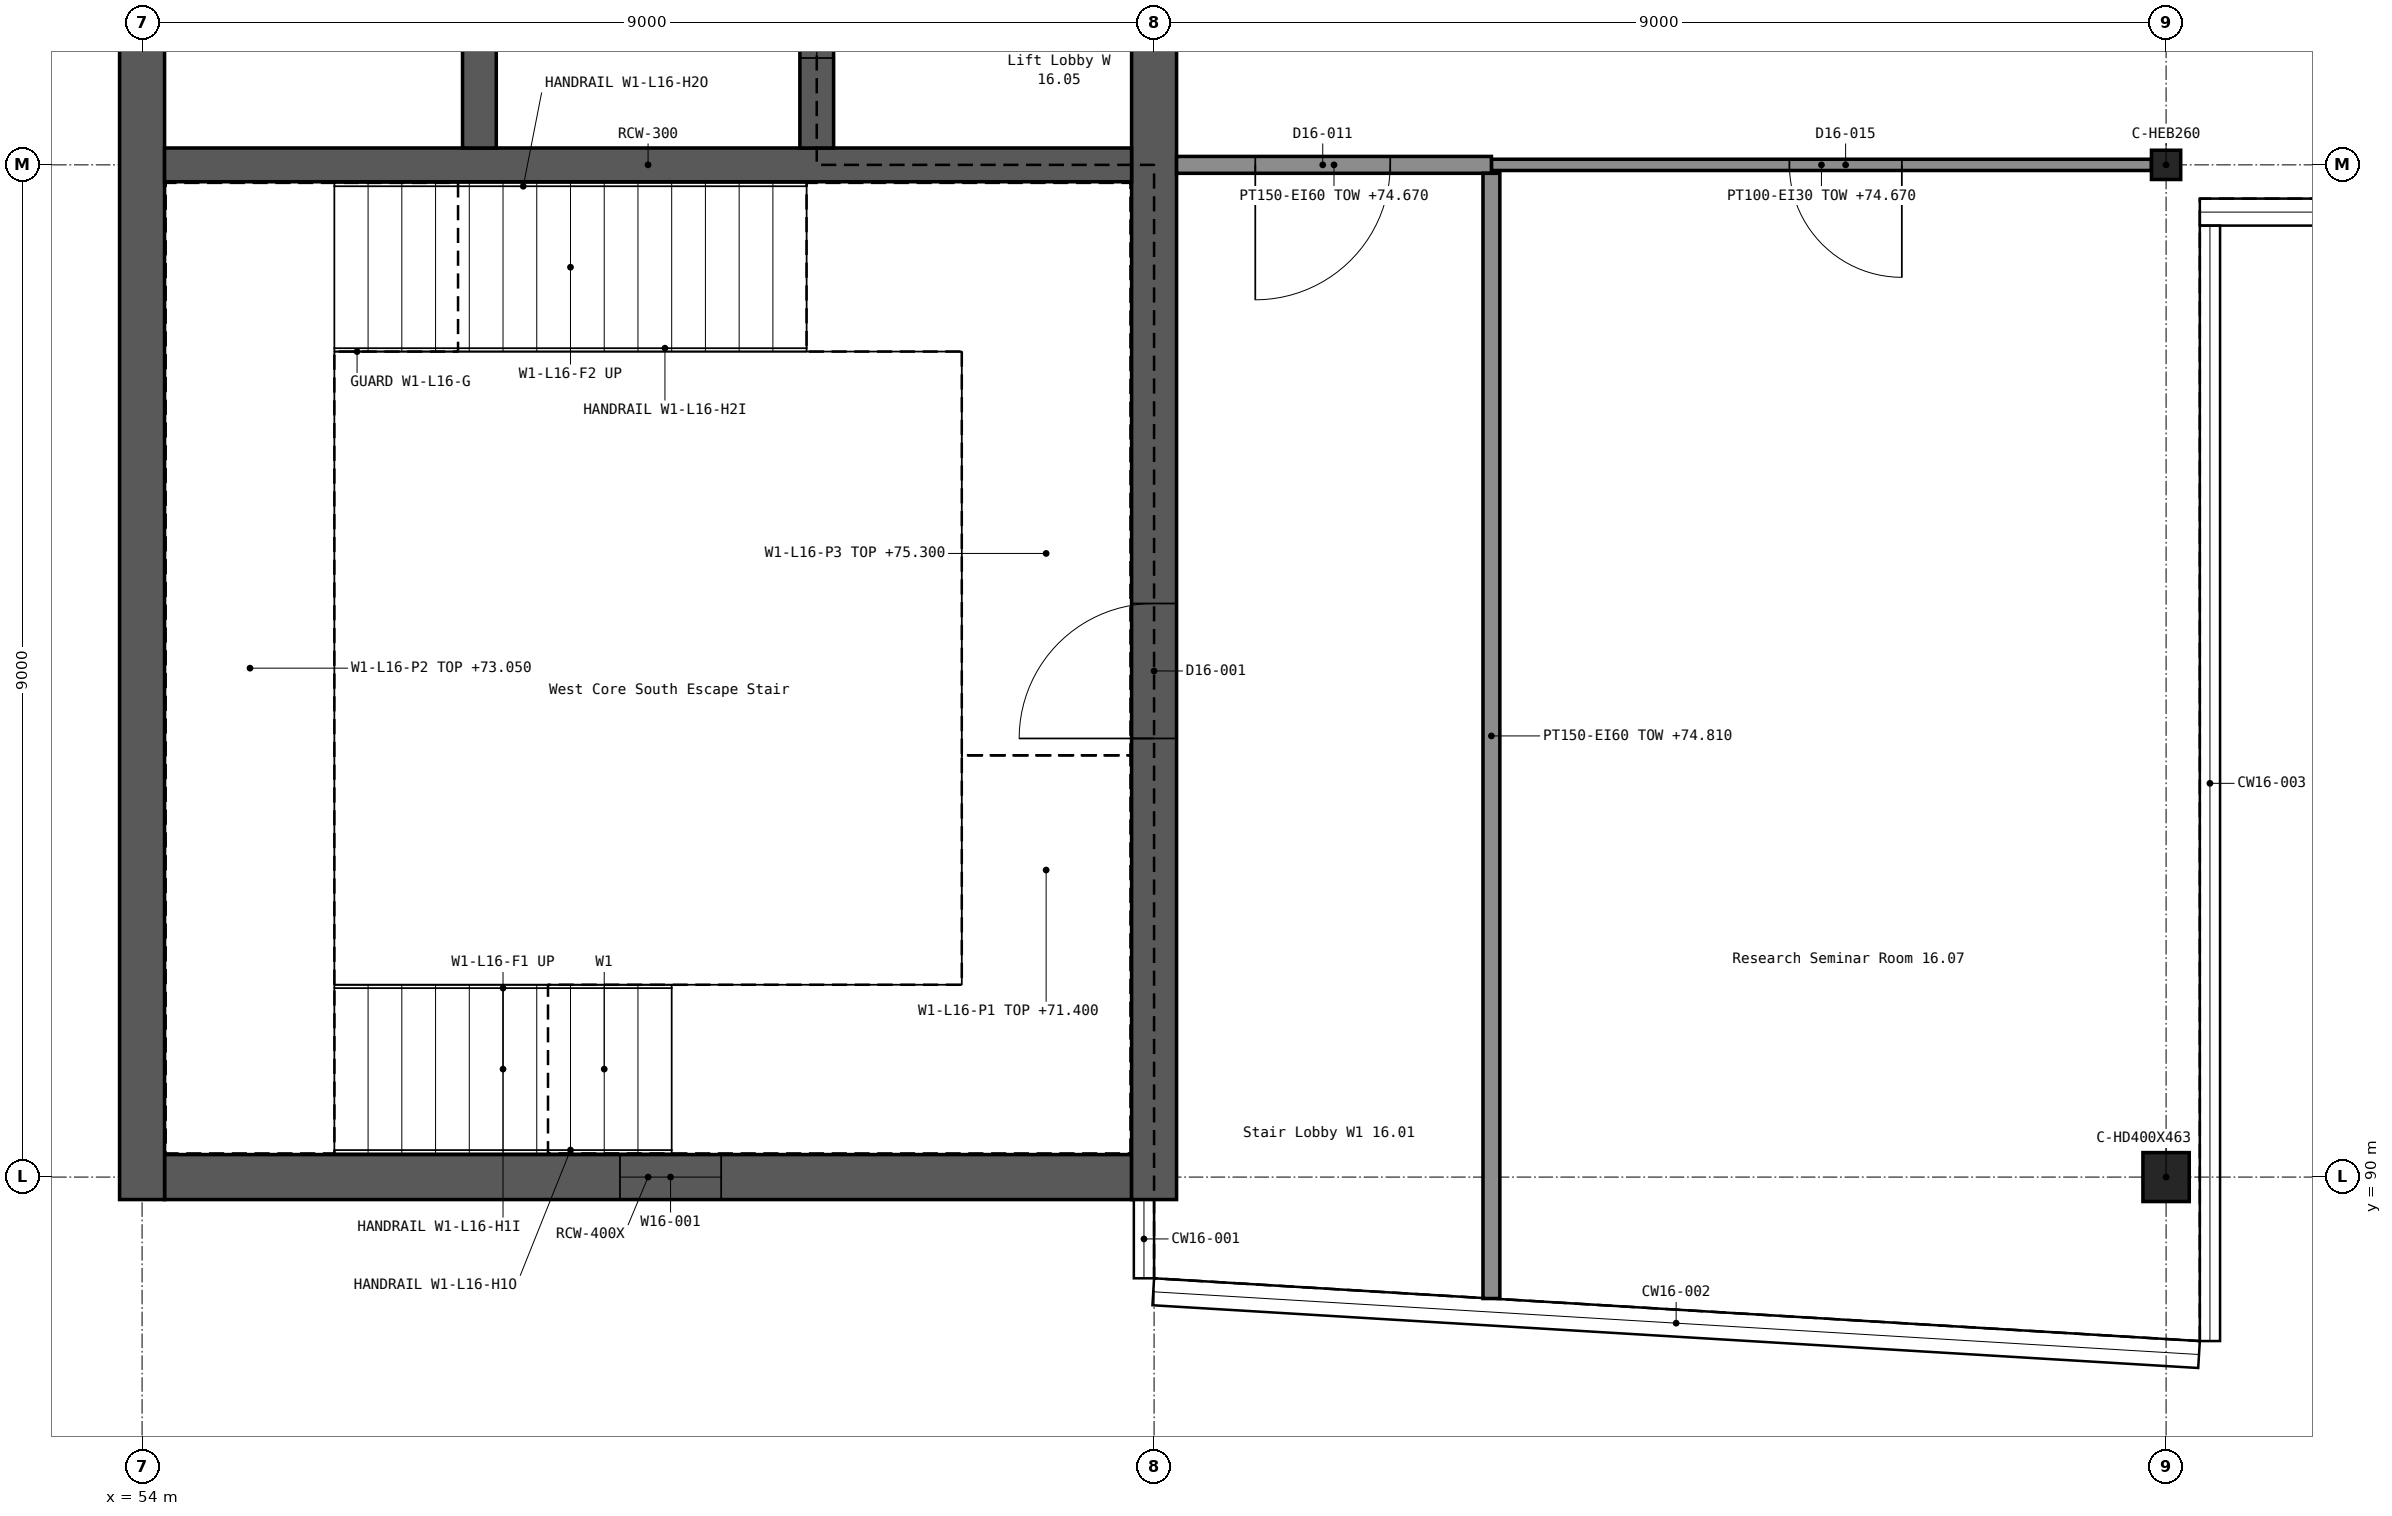
"""IFC4 building model, lengths in metres.
Left out: names, types, materials, properties, quantities, classifications, styles, units other than length and angle.
Written with IfcOpenShell. Run it as: python <this file> out.ifc"""

import sys

from ifc_helpers import new_model, si_unit, direction, frame, frame_2d, origin, origin_2d, place, context, subcontext, project, spatial, rectangle, i_section, extrude, element, fill, save


model = new_model("IFC4")
c1 = context("Model", 3, precision=1e-05, world=origin(), true_north=direction((0.0, 1.0)))
c2 = subcontext(c1, "Body", "Model", "MODEL_VIEW")
j1 = project(units=[si_unit("LENGTHUNIT", "METRE"), si_unit("PLANEANGLEUNIT", "RADIAN")], contexts=[c1])
p1 = place(None, origin())
s1 = spatial("IfcSite", under=j1, at=p1, CompositionType="ELEMENT")
p2 = place(p1, origin())
s2 = spatial("IfcBuilding", under=s1, at=p2, CompositionType="ELEMENT")
p3 = place(p2, frame((0.0, 0.0, 71.4)))
s3 = spatial("IfcBuildingStorey", under=s2, at=p3, CompositionType="ELEMENT", Elevation=71.4)
p4 = place(p3, frame((54.2, 90.0, 0.0), z_axis=(0.0, 0.0, 1.0), x_axis=(1.0, 0.0, 0.0)))
e1 = element("IfcWall", 1, at=p4, inside=s3, PredefinedType="SHEAR", context=c2, shape_type="SweptSolid", body=[
    extrude(rectangle(XDim=8.6, YDim=0.4, at=frame_2d((4.3, 0.0))), origin(), (0.0, 0.0, 1.0), 3.9),
])
p5 = place(p4, frame((4.05, 0.0, 1.2)))
e2 = element("IfcOpeningElement", 2, at=p5, cuts=e1, PredefinedType="OPENING", context=c2, shape_type="SweptSolid", body=[
    extrude(rectangle(XDim=0.9, YDim=1.5, at=frame_2d((0.45, 0.75))), frame((0.0, 0.211, 0.0), z_axis=(0.0, -1.0, 0.0), x_axis=(1.0, 0.0, 0.0)), (0.0, 0.0, 1.0), 0.422),
])
p6 = place(p3, frame((54.0, 89.8, 0.0), z_axis=(0.0, 0.0, 1.0), x_axis=(0.0, 1.0, 0.0)))
e3 = element("IfcWall", 3, at=p6, inside=s3, PredefinedType="SHEAR", context=c2, shape_type="SweptSolid", body=[
    extrude(rectangle(XDim=27.4, YDim=0.4, at=frame_2d((13.7, 0.0))), origin(), (0.0, 0.0, 1.0), 3.9),
])
p7 = place(p3, frame((63.0, 89.8, 0.0), z_axis=(0.0, 0.0, 1.0), x_axis=(0.0, 1.0, 0.0)))
e4 = element("IfcWall", 4, at=p7, inside=s3, PredefinedType="SHEAR", context=c2, shape_type="SweptSolid", body=[
    extrude(rectangle(XDim=27.4, YDim=0.4, at=frame_2d((13.7, 0.0))), origin(), (0.0, 0.0, 1.0), 3.9),
])
p8 = place(p7, frame((4.1, 0.0, 0.0)))
e5 = element("IfcOpeningElement", 5, at=p8, cuts=e4, PredefinedType="OPENING", context=c2, shape_type="SweptSolid", body=[
    extrude(rectangle(XDim=1.2, YDim=2.1, at=frame_2d((0.6, 1.05))), frame((0.0, 0.211, 0.0), z_axis=(0.0, -1.0, 0.0), x_axis=(1.0, 0.0, 0.0)), (0.0, 0.0, 1.0), 0.422),
])
p9 = place(p7, frame((22.1, 0.0, 0.0)))
e6 = element("IfcOpeningElement", 6, at=p9, cuts=e4, PredefinedType="OPENING", context=c2, shape_type="SweptSolid", body=[
    extrude(rectangle(XDim=1.2, YDim=2.1, at=frame_2d((0.6, 1.05))), frame((0.0, 0.211, 0.0), z_axis=(0.0, -1.0, 0.0), x_axis=(1.0, 0.0, 0.0)), (0.0, 0.0, 1.0), 0.422),
])
p10 = place(p7, frame((12.5, 0.0, 0.0)))
e7 = element("IfcOpeningElement", 7, at=p10, cuts=e4, PredefinedType="OPENING", context=c2, shape_type="SweptSolid", body=[
    extrude(rectangle(XDim=2.0, YDim=2.1, at=frame_2d((1.0, 1.05))), frame((0.0, 0.211, 0.0), z_axis=(0.0, -1.0, 0.0), x_axis=(1.0, 0.0, 0.0)), (0.0, 0.0, 1.0), 0.422),
])
p11 = place(p3, frame((54.2, 99.0, 0.0), z_axis=(0.0, 0.0, 1.0), x_axis=(1.0, 0.0, 0.0)))
e8 = element("IfcWall", 8, at=p11, inside=s3, PredefinedType="SHEAR", context=c2, shape_type="SweptSolid", body=[
    extrude(rectangle(XDim=8.6, YDim=0.3, at=frame_2d((4.3, 0.0))), origin(), (0.0, 0.0, 1.0), 3.9),
])
p12 = place(p3, frame((57.0, 99.15, 0.0), z_axis=(0.0, 0.0, 1.0), x_axis=(0.0, 1.0, 0.0)))
e9 = element("IfcWall", 9, at=p12, inside=s3, PredefinedType="SHEAR", context=c2, shape_type="SweptSolid", body=[
    extrude(rectangle(XDim=8.7, YDim=0.3, at=frame_2d((4.35, 0.0))), origin(), (0.0, 0.0, 1.0), 3.9),
])
p13 = place(p3, frame((60.0, 99.15, 0.0), z_axis=(0.0, 0.0, 1.0), x_axis=(0.0, 1.0, 0.0)))
e10 = element("IfcWall", 10, at=p13, inside=s3, PredefinedType="SHEAR", context=c2, shape_type="SweptSolid", body=[
    extrude(rectangle(XDim=8.7, YDim=0.3, at=frame_2d((4.35, 0.0))), origin(), (0.0, 0.0, 1.0), 3.9),
])
p14 = place(p13, frame((0.8, 0.0, 0.0)))
e11 = element("IfcOpeningElement", 11, at=p14, cuts=e10, PredefinedType="OPENING", context=c2, shape_type="SweptSolid", body=[
    extrude(rectangle(XDim=1.1, YDim=2.1, at=frame_2d((0.55, 1.05))), frame((0.0, 0.161, 0.0), z_axis=(0.0, -1.0, 0.0), x_axis=(1.0, 0.0, 0.0)), (0.0, 0.0, 1.0), 0.322),
])
p15 = place(p13, frame((3.8, 0.0, 0.0)))
e12 = element("IfcOpeningElement", 12, at=p15, cuts=e10, PredefinedType="OPENING", context=c2, shape_type="SweptSolid", body=[
    extrude(rectangle(XDim=1.1, YDim=2.1, at=frame_2d((0.55, 1.05))), frame((0.0, 0.161, 0.0), z_axis=(0.0, -1.0, 0.0), x_axis=(1.0, 0.0, 0.0)), (0.0, 0.0, 1.0), 0.322),
])
p16 = place(p13, frame((6.8, 0.0, 0.0)))
e13 = element("IfcOpeningElement", 13, at=p16, cuts=e10, PredefinedType="OPENING", context=c2, shape_type="SweptSolid", body=[
    extrude(rectangle(XDim=1.1, YDim=2.1, at=frame_2d((0.55, 1.05))), frame((0.0, 0.161, 0.0), z_axis=(0.0, -1.0, 0.0), x_axis=(1.0, 0.0, 0.0)), (0.0, 0.0, 1.0), 0.322),
])
p17 = place(p3, frame((72.0, 90.0, 0.0), z_axis=(0.0, 0.0, 1.0), x_axis=(1.0, 0.0, 0.0)))
e14 = element("IfcColumn", 14, at=p17, inside=s3, PredefinedType="COLUMN", context=c2, shape_type="SweptSolid", body=[
    extrude(i_section(OverallWidth=0.412, OverallDepth=0.435, WebThickness=0.036, FlangeThickness=0.057, FilletRadius=0.015, at=origin_2d()), origin(), (0.0, 0.0, 1.0), 3.9),
])
p18 = place(p3, frame((72.0, 99.0, 0.0), z_axis=(0.0, 0.0, 1.0), x_axis=(1.0, 0.0, 0.0)))
e15 = element("IfcColumn", 15, at=p18, inside=s3, PredefinedType="COLUMN", context=c2, shape_type="SweptSolid", body=[
    extrude(i_section(OverallWidth=0.26, OverallDepth=0.26, WebThickness=0.01, FlangeThickness=0.018, FilletRadius=0.024, at=origin_2d()), origin(), (0.0, 0.0, 1.0), 3.9),
])
p19 = place(p3, frame((66.0, 99.0, 0.0), z_axis=(0.0, 0.0, 1.0), x_axis=(1.0, 0.0, 0.0)))
e16 = element("IfcWall", 16, at=p19, inside=s3, PredefinedType="PARTITIONING", context=c2, shape_type="SweptSolid", body=[
    extrude(rectangle(XDim=5.87, YDim=0.1, at=frame_2d((2.935, 0.0))), origin(), (0.0, 0.0, 1.0), 3.27),
])
p20 = place(p19, frame((2.65, 0.0, 0.0)))
e17 = element("IfcOpeningElement", 17, at=p20, cuts=e16, PredefinedType="OPENING", context=c2, shape_type="SweptSolid", body=[
    extrude(rectangle(XDim=1.0, YDim=2.1, at=frame_2d((0.5, 1.05))), frame((0.0, 0.061, 0.0), z_axis=(0.0, -1.0, 0.0), x_axis=(1.0, 0.0, 0.0)), (0.0, 0.0, 1.0), 0.122),
])
p21 = place(p3, frame((63.2, 99.0, 0.0), z_axis=(0.0, 0.0, 1.0), x_axis=(1.0, 0.0, 0.0)))
e18 = element("IfcWall", 18, at=p21, inside=s3, PredefinedType="PARTITIONING", context=c2, shape_type="SweptSolid", body=[
    extrude(rectangle(XDim=2.8, YDim=0.15, at=frame_2d((1.4, 0.0))), origin(), (0.0, 0.0, 1.0), 3.27),
])
p22 = place(p21, frame((0.7, 0.0, 0.0)))
e19 = element("IfcOpeningElement", 19, at=p22, cuts=e18, PredefinedType="OPENING", context=c2, shape_type="SweptSolid", body=[
    extrude(rectangle(XDim=1.2, YDim=2.1, at=frame_2d((0.6, 1.05))), frame((0.0, 0.086, 0.0), z_axis=(0.0, -1.0, 0.0), x_axis=(1.0, 0.0, 0.0)), (0.0, 0.0, 1.0), 0.172),
])
p23 = place(p3, frame((66.0, 88.92, 0.0), z_axis=(0.0, 0.0, 1.0), x_axis=(0.0, 1.0, 0.0)))
e20 = element("IfcWall", 20, at=p23, inside=s3, PredefinedType="PARTITIONING", context=c2, shape_type="SweptSolid", body=[
    extrude(rectangle(XDim=10.005, YDim=0.15, at=frame_2d((5.002, 0.0))), origin(), (0.0, 0.0, 1.0), 3.41),
])
p24 = place(p5, origin())
e21 = element("IfcWindow", 21, at=p24, inside=s3, PartitioningType="SINGLE_PANEL", PredefinedType="WINDOW", context=c2, shape_type="SweptSolid", body=[
    extrude(rectangle(XDim=0.9, YDim=1.5, at=frame_2d((0.45, 0.75))), frame((0.0, 0.03, 0.0), z_axis=(0.0, -1.0, 0.0), x_axis=(1.0, 0.0, 0.0)), (0.0, 0.0, 1.0), 0.06),
])
fill(e2, e21)
p25 = place(p8, origin())
e22 = element("IfcDoor", 22, at=p25, inside=s3, OperationType="SINGLE_SWING_LEFT", PredefinedType="DOOR", context=c2, shape_type="SweptSolid", body=[
    extrude(rectangle(XDim=1.2, YDim=2.1, at=frame_2d((0.6, 1.05))), frame((0.0, 0.025, 0.0), z_axis=(0.0, -1.0, 0.0), x_axis=(1.0, 0.0, 0.0)), (0.0, 0.0, 1.0), 0.05),
])
fill(e5, e22)
p26 = place(p14, origin())
e23 = element("IfcDoor", 23, at=p26, inside=s3, OperationType="DOUBLE_DOOR_SLIDING", PredefinedType="DOOR", context=c2, shape_type="SweptSolid", body=[
    extrude(rectangle(XDim=1.1, YDim=2.1, at=frame_2d((0.55, 1.05))), frame((0.0, 0.025, 0.0), z_axis=(0.0, -1.0, 0.0), x_axis=(1.0, 0.0, 0.0)), (0.0, 0.0, 1.0), 0.05),
])
fill(e11, e23)
p27 = place(p22, frame((1.2, 0.0, 0.0), z_axis=(0.0, 0.0, 1.0), x_axis=(-1.0, 0.0, 0.0)))
e24 = element("IfcDoor", 24, at=p27, inside=s3, OperationType="SINGLE_SWING_RIGHT", PredefinedType="DOOR", context=c2, shape_type="SweptSolid", body=[
    extrude(rectangle(XDim=1.2, YDim=2.1, at=frame_2d((0.6, 1.05))), frame((0.0, 0.025, 0.0), z_axis=(0.0, -1.0, 0.0), x_axis=(1.0, 0.0, 0.0)), (0.0, 0.0, 1.0), 0.05),
])
fill(e19, e24)
p28 = place(p20, frame((1.0, 0.0, 0.0), z_axis=(0.0, 0.0, 1.0), x_axis=(-1.0, 0.0, 0.0)))
e25 = element("IfcDoor", 25, at=p28, inside=s3, OperationType="SINGLE_SWING_LEFT", PredefinedType="DOOR", context=c2, shape_type="SweptSolid", body=[
    extrude(rectangle(XDim=1.0, YDim=2.1, at=frame_2d((0.5, 1.05))), frame((0.0, 0.025, 0.0), z_axis=(0.0, -1.0, 0.0), x_axis=(1.0, 0.0, 0.0)), (0.0, 0.0, 1.0), 0.05),
])
fill(e17, e25)
save(model, sys.argv[1])
